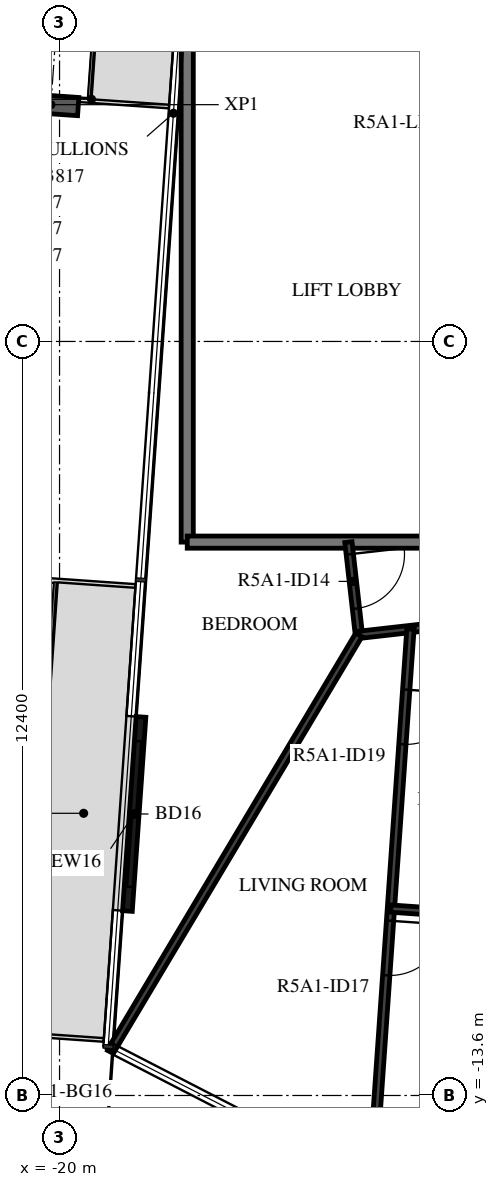
"""IFC4 building model, lengths in metres.
Left out: names, types, materials, properties, quantities, classifications, styles, units other than length and angle.
Written with IfcOpenShell. Run it as: python <this file> out.ifc"""

import sys

from ifc_helpers import new_model, si_unit, direction, frame, frame_2d, origin, origin_2d, place, context, subcontext, project, spatial, rectangle, i_section, extrude, element, fill, save


model = new_model("IFC4")
c1 = context("Model", 3, precision=1e-05, world=origin(), true_north=direction((0.0, 1.0)))
c2 = subcontext(c1, "Body", "Model", "MODEL_VIEW")
j1 = project(units=[si_unit("LENGTHUNIT", "METRE"), si_unit("PLANEANGLEUNIT", "RADIAN")], contexts=[c1])
p1 = place(None, origin())
s1 = spatial("IfcSite", under=j1, at=p1, CompositionType="ELEMENT")
p2 = place(p1, origin())
s2 = spatial("IfcBuilding", under=s1, at=p2, CompositionType="ELEMENT")
p3 = place(p2, frame((0.0, 0.0, 191.9)))
s3 = spatial("IfcBuildingStorey", under=s2, at=p3, CompositionType="ELEMENT", Elevation=191.9)
p4 = place(p3, frame((-20.142, 2.694, -0.38), z_axis=(0.0, 0.0, 1.0), x_axis=(0.069756005795, 0.997564082982, 0.0)))
e1 = element("IfcColumn", 1, at=p4, inside=s3, PredefinedType="COLUMN", context=c2, shape_type="SweptSolid", body=[
    extrude(i_section(OverallWidth=0.3, OverallDepth=0.9, WebThickness=0.019, FlangeThickness=0.035, FilletRadius=0.03, at=origin_2d()), origin(), (0.0, 0.0, 1.0), 3.5),
])
p5 = place(p3, frame((-18.661, -7.375, 0.0), z_axis=(0.0, 0.0, 1.0), x_axis=(-0.069734222855, -0.997565605944, 0.0)))
e2 = element("IfcWall", 2, at=p5, inside=s3, PredefinedType="STANDARD", context=c2, shape_type="SweptSolid", body=[
    extrude(rectangle(XDim=3.2, YDim=0.16, at=frame_2d((1.6, 0.0))), origin(), (0.0, 0.0, 1.0), 3.12),
])
p6 = place(p5, frame((0.4, 0.0, 0.0)))
e3 = element("IfcOpeningElement", 3, at=p6, cuts=e2, PredefinedType="OPENING", context=c2, shape_type="SweptSolid", body=[
    extrude(rectangle(XDim=2.4, YDim=2.4, at=frame_2d((1.2, 1.2))), frame((0.0, 0.09, 0.0), z_axis=(0.0, -1.0, 0.0), x_axis=(1.0, 0.0, 0.0)), (0.0, 0.0, 1.0), 0.18),
])
p7 = place(p3, frame((-17.9, 4.5, 0.0), z_axis=(0.0, 0.0, 1.0), x_axis=(0.0, -1.0, 0.0)))
e4 = element("IfcWall", 4, at=p7, inside=s3, PredefinedType="STANDARD", context=c2, shape_type="SweptSolid", body=[
    extrude(rectangle(XDim=9.0, YDim=0.2, at=frame_2d((4.5, 0.0))), origin(), (0.0, 0.0, 1.0), 3.12),
])
p8 = place(p3, frame((-17.9, -4.5, 0.0), z_axis=(0.0, 0.0, 1.0), x_axis=(1.0, 0.0, 0.0)))
e5 = element("IfcWall", 5, at=p8, inside=s3, PredefinedType="STANDARD", context=c2, shape_type="SweptSolid", body=[
    extrude(rectangle(XDim=6.789, YDim=0.2, at=frame_2d((3.394, 0.0))), origin(), (0.0, 0.0, 1.0), 3.12),
])
p9 = place(p3, frame((-15.25, -4.5, 0.0), z_axis=(0.0, 0.0, 1.0), x_axis=(0.1124919794, -0.99365263275, 0.0)))
e6 = element("IfcWall", 6, at=p9, inside=s3, PredefinedType="PARTITIONING", context=c2, shape_type="SweptSolid", body=[
    extrude(rectangle(XDim=1.534, YDim=0.12, at=frame_2d((0.767, 0.0))), origin(), (0.0, 0.0, 1.0), 3.12),
])
p10 = place(p9, frame((0.2, 0.0, 0.0)))
e7 = element("IfcOpeningElement", 7, at=p10, cuts=e6, PredefinedType="OPENING", context=c2, shape_type="SweptSolid", body=[
    extrude(rectangle(XDim=0.9, YDim=2.1, at=frame_2d((0.45, 1.05))), frame((0.0, 0.07, 0.0), z_axis=(0.0, -1.0, 0.0), x_axis=(1.0, 0.0, 0.0)), (0.0, 0.0, 1.0), 0.14),
])
p11 = place(p3, frame((-15.077, -6.025, 0.0), z_axis=(0.0, 0.0, 1.0), x_axis=(0.993646958109, 0.112542092746, 0.0)))
e8 = element("IfcWall", 8, at=p11, inside=s3, PredefinedType="PARTITIONING", context=c2, shape_type="SweptSolid", body=[
    extrude(rectangle(XDim=1.371, YDim=0.12, at=frame_2d((0.686, 0.0))), origin(), (0.0, 0.0, 1.0), 3.12),
])
p12 = place(p3, frame((-19.156, -12.863, 0.0), z_axis=(0.0, 0.0, 1.0), x_axis=(0.512316386407, 0.858796786335, 0.0)))
e9 = element("IfcWall", 9, at=p12, inside=s3, PredefinedType="PARTITIONING", context=c2, shape_type="SweptSolid", body=[
    extrude(rectangle(XDim=7.963, YDim=0.12, at=frame_2d((3.981, 0.0))), origin(), (0.0, 0.0, 1.0), 3.12),
])
p13 = place(p3, frame((-14.229, -5.929, 0.0), z_axis=(0.0, 0.0, 1.0), x_axis=(-0.069740723375, -0.997565151508, 0.0)))
e10 = element("IfcWall", 10, at=p13, inside=s3, PredefinedType="PARTITIONING", context=c2, shape_type="SweptSolid", body=[
    extrude(rectangle(XDim=10.47, YDim=0.12, at=frame_2d((5.235, 0.0))), origin(), (0.0, 0.0, 1.0), 3.12),
])
p14 = place(p13, frame((4.809, 0.0, 0.0)))
e11 = element("IfcOpeningElement", 11, at=p14, cuts=e10, PredefinedType="OPENING", context=c2, shape_type="SweptSolid", body=[
    extrude(rectangle(XDim=0.9, YDim=2.1, at=frame_2d((0.45, 1.05))), frame((0.0, 0.07, 0.0), z_axis=(0.0, -1.0, 0.0), x_axis=(1.0, 0.0, 0.0)), (0.0, 0.0, 1.0), 0.14),
])
p15 = place(p13, frame((1.0, 0.0, 0.0)))
e12 = element("IfcOpeningElement", 12, at=p15, cuts=e10, PredefinedType="OPENING", context=c2, shape_type="SweptSolid", body=[
    extrude(rectangle(XDim=0.9, YDim=2.1, at=frame_2d((0.45, 1.05))), frame((0.0, 0.07, 0.0), z_axis=(0.0, -1.0, 0.0), x_axis=(1.0, 0.0, 0.0)), (0.0, 0.0, 1.0), 0.14),
])
p16 = place(p3, frame((-14.551, -10.527, 0.0), z_axis=(0.0, 0.0, 1.0), x_axis=(0.997564247633, -0.069753651118, 0.0)))
e13 = element("IfcWall", 13, at=p16, inside=s3, PredefinedType="PARTITIONING", context=c2, shape_type="SweptSolid", body=[
    extrude(rectangle(XDim=3.927, YDim=0.12, at=frame_2d((1.963, 0.0))), origin(), (0.0, 0.0, 1.0), 3.12),
])
p17 = place(p6, origin())
e14 = element("IfcDoor", 14, at=p17, inside=s3, OperationType="DOUBLE_DOOR_SLIDING", PredefinedType="DOOR", context=c2, shape_type="SweptSolid", body=[
    extrude(rectangle(XDim=2.4, YDim=2.4, at=frame_2d((1.2, 1.2))), frame((0.0, 0.025, 0.0), z_axis=(0.0, -1.0, 0.0), x_axis=(1.0, 0.0, 0.0)), (0.0, 0.0, 1.0), 0.05),
])
fill(e3, e14)
p18 = place(p10, origin())
e15 = element("IfcDoor", 15, at=p18, inside=s3, OperationType="SINGLE_SWING_RIGHT", PredefinedType="DOOR", context=c2, shape_type="SweptSolid", body=[
    extrude(rectangle(XDim=0.9, YDim=2.1, at=frame_2d((0.45, 1.05))), frame((0.0, 0.025, 0.0), z_axis=(0.0, -1.0, 0.0), x_axis=(1.0, 0.0, 0.0)), (0.0, 0.0, 1.0), 0.05),
])
fill(e7, e15)
p19 = place(p14, origin())
e16 = element("IfcDoor", 16, at=p19, inside=s3, OperationType="SINGLE_SWING_RIGHT", PredefinedType="DOOR", context=c2, shape_type="SweptSolid", body=[
    extrude(rectangle(XDim=0.9, YDim=2.1, at=frame_2d((0.45, 1.05))), frame((0.0, 0.025, 0.0), z_axis=(0.0, -1.0, 0.0), x_axis=(1.0, 0.0, 0.0)), (0.0, 0.0, 1.0), 0.05),
])
fill(e11, e16)
p20 = place(p15, origin())
e17 = element("IfcDoor", 17, at=p20, inside=s3, OperationType="SINGLE_SWING_LEFT", PredefinedType="DOOR", context=c2, shape_type="SweptSolid", body=[
    extrude(rectangle(XDim=0.9, YDim=2.1, at=frame_2d((0.45, 1.05))), frame((0.0, 0.025, 0.0), z_axis=(0.0, -1.0, 0.0), x_axis=(1.0, 0.0, 0.0)), (0.0, 0.0, 1.0), 0.05),
])
fill(e12, e17)
save(model, sys.argv[1])
